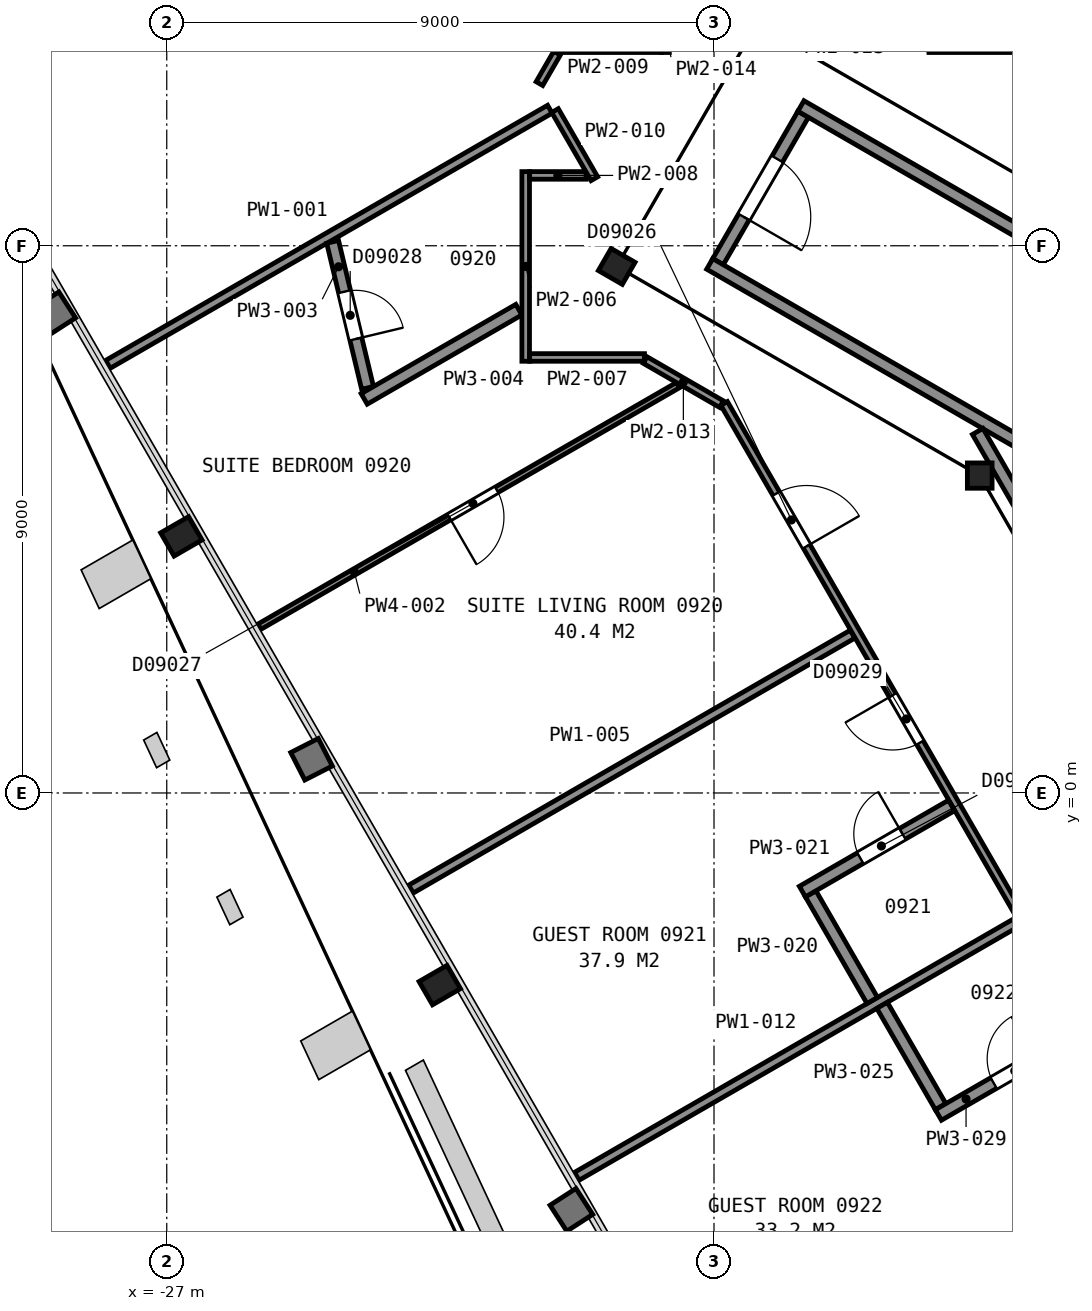
"""IFC4 building model, lengths in metres.
Left out: names, types, materials, properties, quantities, classifications, styles, units other than length and angle.
Written with IfcOpenShell. Run it as: python <this file> out.ifc"""

import sys

from ifc_helpers import new_model, si_unit, direction, frame, frame_2d, origin, origin_2d, place, context, subcontext, project, spatial, rectangle, i_section, extrude, element, fill, save


model = new_model("IFC4")
c1 = context("Model", 3, precision=1e-05, world=origin(), true_north=direction((0.0, 1.0)))
c2 = subcontext(c1, "Body", "Model", "MODEL_VIEW")
j1 = project(units=[si_unit("LENGTHUNIT", "METRE"), si_unit("PLANEANGLEUNIT", "RADIAN")], contexts=[c1])
p1 = place(None, origin())
s1 = spatial("IfcSite", under=j1, at=p1, CompositionType="ELEMENT")
p2 = place(p1, origin())
s2 = spatial("IfcBuilding", under=s1, at=p2, CompositionType="ELEMENT")
p3 = place(p2, frame((0.0, 0.0, 47.6)))
s3 = spatial("IfcBuildingStorey", under=s2, at=p3, CompositionType="ELEMENT", Elevation=47.6)
for number, where, z_axis, x_axis in (
    (1, (-26.76, 4.22, 0.025), (0.0, 0.0, 1.0), (-0.5, 0.866, 0.0)),
    (2, (-22.51, -3.16, 0.025), (0.0, 0.0, 1.0), (-0.5, 0.866, 0.0)),
):
    element("IfcColumn", number, at=place(p3, frame(where, z_axis=z_axis, x_axis=x_axis)), inside=s3, PredefinedType="COLUMN", context=c2, shape_type="SweptSolid", body=[
        extrude(i_section(OverallWidth=0.442, OverallDepth=0.531, WebThickness=0.066, FlangeThickness=0.106, FilletRadius=0.015, at=origin_2d()), origin(), (0.0, 0.0, 1.0), 3.575),
    ])
p4 = place(p3, frame((-19.6, 8.66, 0.0), z_axis=(0.0, 0.0, 1.0), x_axis=(0.5, 0.866025403784, 0.0)))
e3 = element("IfcColumn", 3, at=p4, inside=s3, PredefinedType="COLUMN", context=c2, shape_type="SweptSolid", body=[
    extrude(i_section(OverallWidth=0.419, OverallDepth=0.455, WebThickness=0.042, FlangeThickness=0.068, FilletRadius=0.015, at=origin_2d()), origin(), (0.0, 0.0, 1.0), 3.6),
])
p5 = place(p3, frame((-13.63, 5.22, 0.0), z_axis=(0.0, 0.0, 1.0), x_axis=(1.0, 0.0, 0.0)))
e4 = element("IfcColumn", 4, at=p5, inside=s3, PredefinedType="COLUMN", context=c2, shape_type="SweptSolid", body=[
    extrude(i_section(OverallWidth=0.406, OverallDepth=0.417, WebThickness=0.03, FlangeThickness=0.048, FilletRadius=0.015, at=origin_2d()), origin(), (0.0, 0.0, 1.0), 3.6),
])
p6 = place(p3, frame((-16.534, 11.162, 0.0), z_axis=(0.0, 0.0, 1.0), x_axis=(-0.49998411664, -0.866034573852, 0.0)))
e5 = element("IfcWall", 5, at=p6, inside=s3, PredefinedType="PARTITIONING", context=c2, shape_type="SweptSolid", body=[
    extrude(rectangle(XDim=2.8, YDim=0.2, at=frame_2d((1.4, 0.0))), origin(), (0.0, 0.0, 1.0), 3.35),
])
p7 = place(p6, frame((0.85, 0.0, 0.0)))
e6 = element("IfcOpeningElement", 6, at=p7, cuts=e5, PredefinedType="OPENING", context=c2, shape_type="SweptSolid", body=[
    extrude(rectangle(XDim=1.1, YDim=2.1, at=frame_2d((0.55, 1.05))), frame((0.0, 0.11, 0.0), z_axis=(0.0, -1.0, 0.0), x_axis=(1.0, 0.0, 0.0)), (0.0, 0.0, 1.0), 0.22),
])
for number, where, z_axis, x_axis in (
    (7, (-7.678, 2.701, 0.0), (0.0, 0.0, 1.0), (-0.866, 0.5, 0.0)),
    (8, (-6.178, 5.299, 0.0), (0.0, 0.0, 1.0), (-0.866, 0.5, 0.0)),
):
    element("IfcWall", number, at=place(p3, frame(where, z_axis=z_axis, x_axis=x_axis)), inside=s3, PredefinedType="PARTITIONING", context=c2, shape_type="SweptSolid", body=[
        extrude(rectangle(XDim=12.0, YDim=0.2, at=frame_2d((6.0, 0.0))), origin(), (0.0, 0.0, 1.0), 3.35),
    ])
p8 = place(p3, frame((-13.664, 5.946, 0.0), z_axis=(0.0, 0.0, 1.0), x_axis=(0.499994327219, -0.866028678941, 0.0)))
e9 = element("IfcWall", 9, at=p8, inside=s3, PredefinedType="PARTITIONING", context=c2, shape_type="SweptSolid", body=[
    extrude(rectangle(XDim=23.968, YDim=0.2, at=frame_2d((11.984, 0.0))), origin(), (0.0, 0.0, 1.0), 3.35),
])
p9 = place(p3, frame((-27.967, 7.05, 0.0), z_axis=(0.0, 0.0, 1.0), x_axis=(0.86603249375, 0.499987719618, 0.0)))
e10 = element("IfcWall", 10, at=p9, inside=s3, PredefinedType="PARTITIONING", context=c2, shape_type="SweptSolid", body=[
    extrude(rectangle(XDim=8.392, YDim=0.15, at=frame_2d((4.196, 0.0))), origin(), (0.0, 0.0, 1.0), 2.613),
])
p10 = place(p3, frame((-25.476, 2.735, 0.0), z_axis=(0.0, 0.0, 1.0), x_axis=(0.866077639848, 0.499909513568, 0.0)))
e11 = element("IfcWall", 11, at=p10, inside=s3, PredefinedType="PARTITIONING", context=c2, shape_type="SweptSolid", body=[
    extrude(rectangle(XDim=7.946, YDim=0.1, at=frame_2d((3.973, 0.0))), origin(), (0.0, 0.0, 1.0), 2.613),
])
p11 = place(p10, frame((3.604, 0.0, 0.0)))
e12 = element("IfcOpeningElement", 12, at=p11, cuts=e11, PredefinedType="OPENING", context=c2, shape_type="SweptSolid", body=[
    extrude(rectangle(XDim=0.9, YDim=2.1, at=frame_2d((0.45, 1.05))), frame((0.0, 0.06, 0.0), z_axis=(0.0, -1.0, 0.0), x_axis=(1.0, 0.0, 0.0)), (0.0, 0.0, 1.0), 0.12),
])
p12 = place(p3, frame((-24.272, 9.064, 0.0), z_axis=(0.0, 0.0, 1.0), x_axis=(0.232636237171, -0.972563818551, 0.0)))
e13 = element("IfcWall", 13, at=p12, inside=s3, PredefinedType="PARTITIONING", context=c2, shape_type="SweptSolid", body=[
    extrude(rectangle(XDim=2.469, YDim=0.2, at=frame_2d((1.235, 0.0))), origin(), (0.0, 0.0, 1.0), 2.613),
])
p13 = place(p12, frame((0.842, 0.0, 0.0)))
e14 = element("IfcOpeningElement", 14, at=p13, cuts=e13, PredefinedType="OPENING", context=c2, shape_type="SweptSolid", body=[
    extrude(rectangle(XDim=0.8, YDim=2.1, at=frame_2d((0.4, 1.05))), frame((0.0, 0.11, 0.0), z_axis=(0.0, -1.0, 0.0), x_axis=(1.0, 0.0, 0.0)), (0.0, 0.0, 1.0), 0.22),
])
p14 = place(p3, frame((-23.753, 6.481, 0.0), z_axis=(0.0, 0.0, 1.0), x_axis=(0.866070680301, 0.499921570572, 0.0)))
e15 = element("IfcWall", 15, at=p14, inside=s3, PredefinedType="PARTITIONING", context=c2, shape_type="SweptSolid", body=[
    extrude(rectangle(XDim=2.937, YDim=0.2, at=frame_2d((1.468, 0.0))), origin(), (0.0, 0.0, 1.0), 2.613),
])
p15 = place(p3, frame((-22.984, -1.581, 0.0), z_axis=(0.0, 0.0, 1.0), x_axis=(0.866040157966, 0.499974444137, 0.0)))
e16 = element("IfcWall", 16, at=p15, inside=s3, PredefinedType="PARTITIONING", context=c2, shape_type="SweptSolid", body=[
    extrude(rectangle(XDim=8.387, YDim=0.15, at=frame_2d((4.193, 0.0))), origin(), (0.0, 0.0, 1.0), 2.613),
])
p16 = place(p3, frame((-21.097, 7.101, 0.0), z_axis=(0.0, 0.0, 1.0), x_axis=(0.0, 1.0, 0.0)))
e17 = element("IfcWall", 17, at=p16, inside=s3, PredefinedType="PARTITIONING", context=c2, shape_type="SweptSolid", body=[
    extrude(rectangle(XDim=3.119, YDim=0.125, at=frame_2d((1.56, 0.0))), origin(), (0.0, 0.0, 1.0), 2.613),
])
p17 = place(p3, frame((-21.032, 7.163, 0.0), z_axis=(0.0, 0.0, 1.0), x_axis=(1.0, 0.0, 0.0)))
e18 = element("IfcWall", 18, at=p17, inside=s3, PredefinedType="PARTITIONING", context=c2, shape_type="SweptSolid", body=[
    extrude(rectangle(XDim=1.888, YDim=0.125, at=frame_2d((0.944, 0.0))), origin(), (0.0, 0.0, 1.0), 2.613),
])
p18 = place(p3, frame((-21.032, 10.157, 0.0), z_axis=(0.0, 0.0, 1.0), x_axis=(1.0, 0.0, 0.0)))
e19 = element("IfcWall", 19, at=p18, inside=s3, PredefinedType="PARTITIONING", context=c2, shape_type="SweptSolid", body=[
    extrude(rectangle(XDim=0.928, YDim=0.125, at=frame_2d((0.464, 0.0))), origin(), (0.0, 0.0, 1.0), 2.613),
])
p19 = place(p3, frame((-20.871, 11.667, 0.0), z_axis=(0.0, 0.0, 1.0), x_axis=(0.500769941337, 0.865580421367, 0.0)))
e20 = element("IfcWall", 20, at=p19, inside=s3, PredefinedType="PARTITIONING", context=c2, shape_type="SweptSolid", body=[
    extrude(rectangle(XDim=0.578, YDim=0.125, at=frame_2d((0.289, 0.0))), origin(), (0.0, 0.0, 1.0), 2.613),
])
p20 = place(p3, frame((-20.615, 11.223, 0.0), z_axis=(0.0, 0.0, 1.0), x_axis=(0.500076370288, -0.865981306888, 0.0)))
e21 = element("IfcWall", 21, at=p20, inside=s3, PredefinedType="PARTITIONING", context=c2, shape_type="SweptSolid", body=[
    extrude(rectangle(XDim=1.294, YDim=0.125, at=frame_2d((0.647, 0.0))), origin(), (0.0, 0.0, 1.0), 2.613),
])
p21 = place(p3, frame((-20.602, 12.241, 0.0), z_axis=(0.0, 0.0, 1.0), x_axis=(1.0, 0.0, 0.0)))
e22 = element("IfcWall", 22, at=p21, inside=s3, PredefinedType="PARTITIONING", context=c2, shape_type="SweptSolid", body=[
    extrude(rectangle(XDim=1.74, YDim=0.125, at=frame_2d((0.87, 0.0))), origin(), (0.0, 0.0, 1.0), 2.613),
])
p22 = place(p3, frame((-20.256, -6.305, 0.0), z_axis=(0.0, 0.0, 1.0), x_axis=(0.866037818403, 0.499978496633, 0.0)))
e23 = element("IfcWall", 23, at=p22, inside=s3, PredefinedType="PARTITIONING", context=c2, shape_type="SweptSolid", body=[
    extrude(rectangle(XDim=8.391, YDim=0.15, at=frame_2d((4.196, 0.0))), origin(), (0.0, 0.0, 1.0), 2.613),
])
p23 = place(p3, frame((-19.132, 7.121, 0.0), z_axis=(0.0, 0.0, 1.0), x_axis=(0.865894215669, -0.500227155672, 0.0)))
e24 = element("IfcWall", 24, at=p23, inside=s3, PredefinedType="PARTITIONING", context=c2, shape_type="SweptSolid", body=[
    extrude(rectangle(XDim=1.451, YDim=0.125, at=frame_2d((0.726, 0.0))), origin(), (0.0, 0.0, 1.0), 2.613),
])
p24 = place(p3, frame((-18.797, 12.178, 0.0), z_axis=(0.0, 0.0, 1.0), x_axis=(0.0, 1.0, 0.0)))
e25 = element("IfcWall", 25, at=p24, inside=s3, PredefinedType="PARTITIONING", context=c2, shape_type="SweptSolid", body=[
    extrude(rectangle(XDim=1.894, YDim=0.125, at=frame_2d((0.947, 0.0))), origin(), (0.0, 0.0, 1.0), 2.613),
])
p25 = place(p24, frame((0.562, 0.0, 0.0)))
e26 = element("IfcOpeningElement", 26, at=p25, cuts=e25, PredefinedType="OPENING", context=c2, shape_type="SweptSolid", body=[
    extrude(rectangle(XDim=0.9, YDim=2.1, at=frame_2d((0.45, 1.05))), frame((0.0, 0.073, 0.0), z_axis=(0.0, -1.0, 0.0), x_axis=(1.0, 0.0, 0.0)), (0.0, 0.0, 1.0), 0.145),
])
p26 = place(p3, frame((-3.766, -17.959, 0.0), z_axis=(0.0, 0.0, 1.0), x_axis=(-0.500002884005, 0.866023738697, 0.0)))
e27 = element("IfcWall", 27, at=p26, inside=s3, PredefinedType="PARTITIONING", context=c2, shape_type="SweptSolid", body=[
    extrude(rectangle(XDim=28.135, YDim=0.125, at=frame_2d((14.067, 0.0))), origin(), (0.0, 0.0, 1.0), 2.613),
])
p27 = place(p26, frame((25.422, 0.0, 0.0)))
e28 = element("IfcOpeningElement", 28, at=p27, cuts=e27, PredefinedType="OPENING", context=c2, shape_type="SweptSolid", body=[
    extrude(rectangle(XDim=1.0, YDim=2.1, at=frame_2d((0.5, 1.05))), frame((0.0, 0.073, 0.0), z_axis=(0.0, -1.0, 0.0), x_axis=(1.0, 0.0, 0.0)), (0.0, 0.0, 1.0), 0.145),
])
p28 = place(p26, frame((21.693, 0.0, 0.0)))
e29 = element("IfcOpeningElement", 29, at=p28, cuts=e27, PredefinedType="OPENING", context=c2, shape_type="SweptSolid", body=[
    extrude(rectangle(XDim=0.9, YDim=2.1, at=frame_2d((0.45, 1.05))), frame((0.0, 0.073, 0.0), z_axis=(0.0, -1.0, 0.0), x_axis=(1.0, 0.0, 0.0)), (0.0, 0.0, 1.0), 0.145),
])
p29 = place(p26, frame((14.438, 0.0, 0.0)))
e30 = element("IfcOpeningElement", 30, at=p29, cuts=e27, PredefinedType="OPENING", context=c2, shape_type="SweptSolid", body=[
    extrude(rectangle(XDim=0.9, YDim=2.1, at=frame_2d((0.45, 1.05))), frame((0.0, 0.073, 0.0), z_axis=(0.0, -1.0, 0.0), x_axis=(1.0, 0.0, 0.0)), (0.0, 0.0, 1.0), 0.145),
])
p30 = place(p26, frame((11.712, 0.0, 0.0)))
e31 = element("IfcOpeningElement", 31, at=p30, cuts=e27, PredefinedType="OPENING", context=c2, shape_type="SweptSolid", body=[
    extrude(rectangle(XDim=0.9, YDim=2.1, at=frame_2d((0.45, 1.05))), frame((0.0, 0.073, 0.0), z_axis=(0.0, -1.0, 0.0), x_axis=(1.0, 0.0, 0.0)), (0.0, 0.0, 1.0), 0.145),
])
p31 = place(p26, frame((4.787, 0.0, 0.0)))
e32 = element("IfcOpeningElement", 32, at=p31, cuts=e27, PredefinedType="OPENING", context=c2, shape_type="SweptSolid", body=[
    extrude(rectangle(XDim=0.9, YDim=2.1, at=frame_2d((0.45, 1.05))), frame((0.0, 0.073, 0.0), z_axis=(0.0, -1.0, 0.0), x_axis=(1.0, 0.0, 0.0)), (0.0, 0.0, 1.0), 0.145),
])
p32 = place(p26, frame((1.762, 0.0, 0.0)))
e33 = element("IfcOpeningElement", 33, at=p32, cuts=e27, PredefinedType="OPENING", context=c2, shape_type="SweptSolid", body=[
    extrude(rectangle(XDim=0.9, YDim=2.1, at=frame_2d((0.45, 1.05))), frame((0.0, 0.073, 0.0), z_axis=(0.0, -1.0, 0.0), x_axis=(1.0, 0.0, 0.0)), (0.0, 0.0, 1.0), 0.145),
])
p33 = place(p3, frame((-17.844, -10.484, 0.0), z_axis=(0.0, 0.0, 1.0), x_axis=(0.866037818403, 0.499978496633, 0.0)))
e34 = element("IfcWall", 34, at=p33, inside=s3, PredefinedType="PARTITIONING", context=c2, shape_type="SweptSolid", body=[
    extrude(rectangle(XDim=8.391, YDim=0.15, at=frame_2d((4.196, 0.0))), origin(), (0.0, 0.0, 1.0), 2.613),
])
p34 = place(p3, frame((-16.41, -1.659, 0.0), z_axis=(0.0, 0.0, 1.0), x_axis=(0.49983374806, -0.866121368112, 0.0)))
e35 = element("IfcWall", 35, at=p34, inside=s3, PredefinedType="PARTITIONING", context=c2, shape_type="SweptSolid", body=[
    extrude(rectangle(XDim=2.026, YDim=0.2, at=frame_2d((1.013, 0.0))), origin(), (0.0, 0.0, 1.0), 2.613),
])
p35 = place(p3, frame((-14.094, -0.206, 0.0), z_axis=(0.0, 0.0, 1.0), x_axis=(-0.866033446572, -0.499986069224, 0.0)))
e36 = element("IfcWall", 36, at=p35, inside=s3, PredefinedType="PARTITIONING", context=c2, shape_type="SweptSolid", body=[
    extrude(rectangle(XDim=2.833, YDim=0.2, at=frame_2d((1.416, 0.0))), origin(), (0.0, 0.0, 1.0), 2.613),
])
p36 = place(p35, frame((0.933, 0.0, 0.0)))
e37 = element("IfcOpeningElement", 37, at=p36, cuts=e36, PredefinedType="OPENING", context=c2, shape_type="SweptSolid", body=[
    extrude(rectangle(XDim=0.8, YDim=2.1, at=frame_2d((0.4, 1.05))), frame((0.0, 0.11, 0.0), z_axis=(0.0, -1.0, 0.0), x_axis=(1.0, 0.0, 0.0)), (0.0, 0.0, 1.0), 0.22),
])
p37 = place(p3, frame((-15.236, -3.493, 0.0), z_axis=(0.0, 0.0, 1.0), x_axis=(0.500190942922, -0.865915134767, 0.0)))
e38 = element("IfcWall", 38, at=p37, inside=s3, PredefinedType="PARTITIONING", context=c2, shape_type="SweptSolid", body=[
    extrude(rectangle(XDim=1.925, YDim=0.2, at=frame_2d((0.962, 0.0))), origin(), (0.0, 0.0, 1.0), 2.613),
])
p38 = place(p3, frame((-14.465, 12.241, 0.0), z_axis=(0.0, 0.0, 1.0), x_axis=(1.0, 0.0, 0.0)))
e39 = element("IfcWall", 39, at=p38, inside=s3, PredefinedType="PARTITIONING", context=c2, shape_type="SweptSolid", body=[
    extrude(rectangle(XDim=28.929, YDim=0.125, at=frame_2d((14.465, 0.0))), origin(), (0.0, 0.0, 1.0), 2.613),
])
p39 = place(p38, frame((25.252, 0.0, 0.0)))
e40 = element("IfcOpeningElement", 40, at=p39, cuts=e39, PredefinedType="OPENING", context=c2, shape_type="SweptSolid", body=[
    extrude(rectangle(XDim=0.9, YDim=2.1, at=frame_2d((0.45, 1.05))), frame((0.0, 0.073, 0.0), z_axis=(0.0, -1.0, 0.0), x_axis=(1.0, 0.0, 0.0)), (0.0, 0.0, 1.0), 0.145),
])
p40 = place(p38, frame((22.564, 0.0, 0.0)))
e41 = element("IfcOpeningElement", 41, at=p40, cuts=e39, PredefinedType="OPENING", context=c2, shape_type="SweptSolid", body=[
    extrude(rectangle(XDim=0.9, YDim=2.1, at=frame_2d((0.45, 1.05))), frame((0.0, 0.073, 0.0), z_axis=(0.0, -1.0, 0.0), x_axis=(1.0, 0.0, 0.0)), (0.0, 0.0, 1.0), 0.145),
])
p41 = place(p38, frame((15.302, 0.0, 0.0)))
e42 = element("IfcOpeningElement", 42, at=p41, cuts=e39, PredefinedType="OPENING", context=c2, shape_type="SweptSolid", body=[
    extrude(rectangle(XDim=0.9, YDim=2.1, at=frame_2d((0.45, 1.05))), frame((0.0, 0.073, 0.0), z_axis=(0.0, -1.0, 0.0), x_axis=(1.0, 0.0, 0.0)), (0.0, 0.0, 1.0), 0.145),
])
p42 = place(p38, frame((12.365, 0.0, 0.0)))
e43 = element("IfcOpeningElement", 43, at=p42, cuts=e39, PredefinedType="OPENING", context=c2, shape_type="SweptSolid", body=[
    extrude(rectangle(XDim=0.9, YDim=2.1, at=frame_2d((0.45, 1.05))), frame((0.0, 0.073, 0.0), z_axis=(0.0, -1.0, 0.0), x_axis=(1.0, 0.0, 0.0)), (0.0, 0.0, 1.0), 0.145),
])
p43 = place(p38, frame((5.477, 0.0, 0.0)))
e44 = element("IfcOpeningElement", 44, at=p43, cuts=e39, PredefinedType="OPENING", context=c2, shape_type="SweptSolid", body=[
    extrude(rectangle(XDim=0.9, YDim=2.1, at=frame_2d((0.45, 1.05))), frame((0.0, 0.073, 0.0), z_axis=(0.0, -1.0, 0.0), x_axis=(1.0, 0.0, 0.0)), (0.0, 0.0, 1.0), 0.145),
])
p44 = place(p38, frame((2.789, 0.0, 0.0)))
e45 = element("IfcOpeningElement", 45, at=p44, cuts=e39, PredefinedType="OPENING", context=c2, shape_type="SweptSolid", body=[
    extrude(rectangle(XDim=0.9, YDim=2.1, at=frame_2d((0.45, 1.05))), frame((0.0, 0.073, 0.0), z_axis=(0.0, -1.0, 0.0), x_axis=(1.0, 0.0, 0.0)), (0.0, 0.0, 1.0), 0.145),
])
p45 = place(p3, frame((-14.31, -5.296, 0.0), z_axis=(0.0, 0.0, 1.0), x_axis=(0.866012976267, 0.500021524473, 0.0)))
e46 = element("IfcWall", 46, at=p45, inside=s3, PredefinedType="PARTITIONING", context=c2, shape_type="SweptSolid", body=[
    extrude(rectangle(XDim=2.732, YDim=0.2, at=frame_2d((1.366, 0.0))), origin(), (0.0, 0.0, 1.0), 2.613),
])
p46 = place(p45, frame((1.05, 0.0, 0.0)))
e47 = element("IfcOpeningElement", 47, at=p46, cuts=e46, PredefinedType="OPENING", context=c2, shape_type="SweptSolid", body=[
    extrude(rectangle(XDim=0.8, YDim=2.1, at=frame_2d((0.4, 1.05))), frame((0.0, 0.11, 0.0), z_axis=(0.0, -1.0, 0.0), x_axis=(1.0, 0.0, 0.0)), (0.0, 0.0, 1.0), 0.22),
])
p47 = place(p7, origin())
e48 = element("IfcDoor", 48, at=p47, inside=s3, OperationType="SINGLE_SWING_RIGHT", PredefinedType="DOOR", context=c2, shape_type="SweptSolid", body=[
    extrude(rectangle(XDim=1.1, YDim=2.1, at=frame_2d((0.55, 1.05))), frame((0.0, 0.025, 0.0), z_axis=(0.0, -1.0, 0.0), x_axis=(1.0, 0.0, 0.0)), (0.0, 0.0, 1.0), 0.05),
])
fill(e6, e48)
p48 = place(p11, origin())
e49 = element("IfcDoor", 49, at=p48, inside=s3, OperationType="SINGLE_SWING_LEFT", PredefinedType="DOOR", context=c2, shape_type="SweptSolid", body=[
    extrude(rectangle(XDim=0.9, YDim=2.1, at=frame_2d((0.45, 1.05))), frame((0.0, 0.025, 0.0), z_axis=(0.0, -1.0, 0.0), x_axis=(1.0, 0.0, 0.0)), (0.0, 0.0, 1.0), 0.05),
])
fill(e12, e49)
p49 = place(p13, origin())
e50 = element("IfcDoor", 50, at=p49, inside=s3, OperationType="SINGLE_SWING_RIGHT", PredefinedType="DOOR", context=c2, shape_type="SweptSolid", body=[
    extrude(rectangle(XDim=0.8, YDim=2.1, at=frame_2d((0.4, 1.05))), frame((0.0, 0.025, 0.0), z_axis=(0.0, -1.0, 0.0), x_axis=(1.0, 0.0, 0.0)), (0.0, 0.0, 1.0), 0.05),
])
fill(e14, e50)
p50 = place(p27, origin())
e51 = element("IfcDoor", 51, at=p50, inside=s3, OperationType="SINGLE_SWING_LEFT", PredefinedType="DOOR", context=c2, shape_type="SweptSolid", body=[
    extrude(rectangle(XDim=1.0, YDim=2.1, at=frame_2d((0.5, 1.05))), frame((0.0, 0.025, 0.0), z_axis=(0.0, -1.0, 0.0), x_axis=(1.0, 0.0, 0.0)), (0.0, 0.0, 1.0), 0.05),
])
fill(e28, e51)
p51 = place(p28, origin())
e52 = element("IfcDoor", 52, at=p51, inside=s3, OperationType="SINGLE_SWING_RIGHT", PredefinedType="DOOR", context=c2, shape_type="SweptSolid", body=[
    extrude(rectangle(XDim=0.9, YDim=2.1, at=frame_2d((0.45, 1.05))), frame((0.0, 0.025, 0.0), z_axis=(0.0, -1.0, 0.0), x_axis=(1.0, 0.0, 0.0)), (0.0, 0.0, 1.0), 0.05),
])
fill(e29, e52)
p52 = place(p36, origin())
e53 = element("IfcDoor", 53, at=p52, inside=s3, OperationType="SINGLE_SWING_LEFT", PredefinedType="DOOR", context=c2, shape_type="SweptSolid", body=[
    extrude(rectangle(XDim=0.8, YDim=2.1, at=frame_2d((0.4, 1.05))), frame((0.0, 0.025, 0.0), z_axis=(0.0, -1.0, 0.0), x_axis=(1.0, 0.0, 0.0)), (0.0, 0.0, 1.0), 0.05),
])
fill(e37, e53)
p53 = place(p46, origin())
e54 = element("IfcDoor", 54, at=p53, inside=s3, OperationType="SINGLE_SWING_RIGHT", PredefinedType="DOOR", context=c2, shape_type="SweptSolid", body=[
    extrude(rectangle(XDim=0.8, YDim=2.1, at=frame_2d((0.4, 1.05))), frame((0.0, 0.025, 0.0), z_axis=(0.0, -1.0, 0.0), x_axis=(1.0, 0.0, 0.0)), (0.0, 0.0, 1.0), 0.05),
])
fill(e47, e54)
save(model, sys.argv[1])
